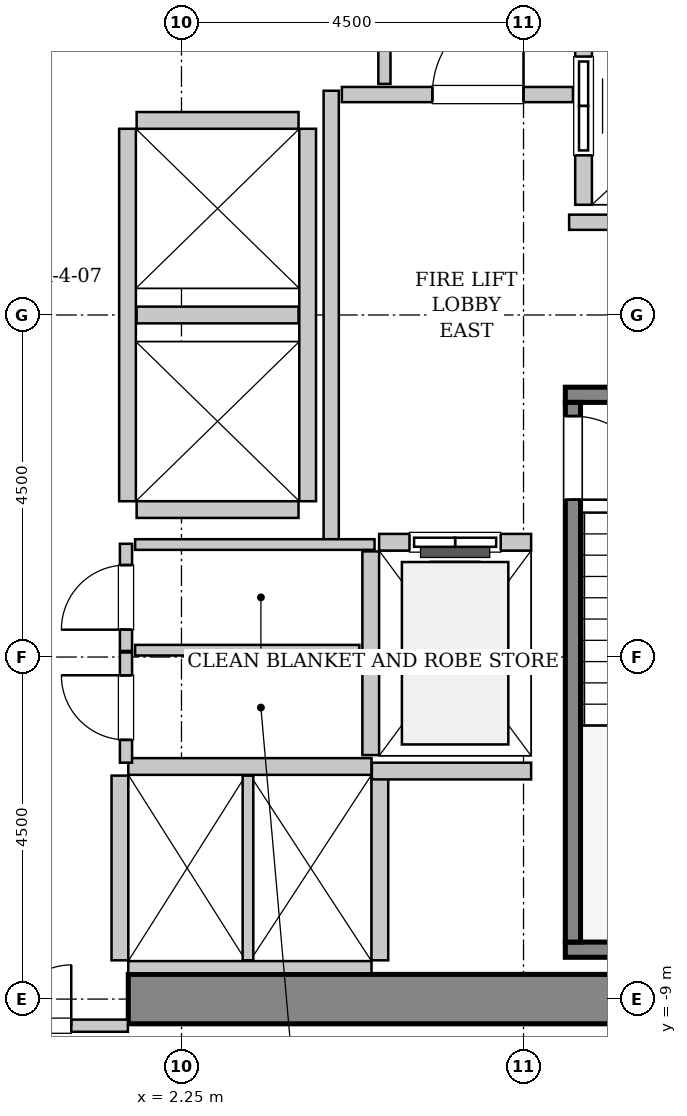
"""IFC4 building model, lengths in metres.
Left out: names, types, materials, properties, quantities, classifications, styles, units other than length and angle.
Written with IfcOpenShell. Run it as: python <this file> out.ifc"""

import sys

from ifc_helpers import new_model, si_unit, direction, frame, frame_2d, origin, place, context, subcontext, project, spatial, rectangle, extrude, source, transform, mapped, element, fill, save


model = new_model("IFC4")
c1 = context("Model", 3, precision=1e-05, world=origin(), true_north=direction((0.0, 1.0)))
c2 = subcontext(c1, "Body", "Model", "MODEL_VIEW")
j1 = project(units=[si_unit("LENGTHUNIT", "METRE"), si_unit("PLANEANGLEUNIT", "RADIAN")], contexts=[c1])
p1 = place(None, origin())
s1 = spatial("IfcSite", under=j1, at=p1, CompositionType="ELEMENT")
p2 = place(p1, origin())
s2 = spatial("IfcBuilding", under=s1, at=p2, CompositionType="ELEMENT")
p3 = place(p2, frame((0.0, 0.0, 44.4)))
s3 = spatial("IfcBuildingStorey", under=s2, at=p3, CompositionType="ELEMENT", Elevation=44.4)
m1 = source(origin(), c2, "Body", "SweptSolid", [
    extrude(rectangle(XDim=10.025, YDim=0.65, at=frame_2d((5.012, 0.0))), origin(), (0.0, 0.0, 1.0), 3.8),
])
p4 = place(p3, frame((1.55, -9.0, 0.0), z_axis=(0.0, 0.0, 1.0), x_axis=(1.0, 0.0, 0.0)))
e1 = element("IfcWall", 1, at=p4, inside=s3, PredefinedType="SHEAR", context=c2, shape_type="MappedRepresentation", body=[
    mapped(m1, transform((0.0, 0.0, 0.0), x_axis=(1.0, 0.0, 0.0), y_axis=(0.0, 1.0, 0.0), z_axis=(0.0, 0.0, 1.0), scale=1.0)),
])
m2 = source(origin(), c2, "Body", "SweptSolid", [
    extrude(rectangle(XDim=3.4, YDim=0.2, at=frame_2d((1.7, 0.0))), origin(), (0.0, 0.0, 1.0), 3.8),
])
p5 = place(p3, frame((7.3, -1.05, 0.0), z_axis=(0.0, 0.0, 1.0), x_axis=(1.0, 0.0, 0.0)))
e2 = element("IfcWall", 2, at=p5, inside=s3, PredefinedType="SOLIDWALL", context=c2, shape_type="MappedRepresentation", body=[
    mapped(m2, transform((0.0, 0.0, 0.0), x_axis=(1.0, 0.0, 0.0), y_axis=(0.0, 1.0, 0.0), z_axis=(0.0, 0.0, 1.0), scale=1.0)),
])
m3 = source(origin(), c2, "Body", "SweptSolid", [
    extrude(rectangle(XDim=3.63, YDim=0.2, at=frame_2d((1.815, 0.0))), origin(), (0.0, 0.0, 1.0), 3.8),
])
p6 = place(p3, frame((7.3, -8.35, 0.0), z_axis=(0.0, 0.0, 1.0), x_axis=(1.0, 0.0, 0.0)))
e3 = element("IfcWall", 3, at=p6, inside=s3, PredefinedType="SOLIDWALL", context=c2, shape_type="MappedRepresentation", body=[
    mapped(m3, transform((0.0, 0.0, 0.0), x_axis=(1.0, 0.0, 0.0), y_axis=(0.0, 1.0, 0.0), z_axis=(0.0, 0.0, 1.0), scale=1.0)),
])
m4 = source(origin(), c2, "Body", "SweptSolid", [
    extrude(rectangle(XDim=7.1, YDim=0.2, at=frame_2d((3.55, 0.0))), origin(), (0.0, 0.0, 1.0), 3.8),
])
p7 = place(p3, frame((7.4, -1.15, 0.0), z_axis=(0.0, 0.0, 1.0), x_axis=(0.0, -1.0, 0.0)))
e4 = element("IfcWall", 4, at=p7, inside=s3, PredefinedType="SOLIDWALL", context=c2, shape_type="MappedRepresentation", body=[
    mapped(m4, transform((0.0, 0.0, 0.0), x_axis=(1.0, 0.0, 0.0), y_axis=(0.0, 1.0, 0.0), z_axis=(0.0, 0.0, 1.0), scale=1.0)),
])
p8 = place(p7, frame((0.18, 0.0, 0.0)))
e5 = element("IfcOpeningElement", 5, at=p8, cuts=e4, PredefinedType="OPENING", context=c2, shape_type="SweptSolid", body=[
    extrude(rectangle(XDim=1.1, YDim=2.15, at=frame_2d((0.55, 1.075))), frame((0.0, 0.11, 0.0), z_axis=(0.0, -1.0, 0.0), x_axis=(1.0, 0.0, 0.0)), (0.0, 0.0, 1.0), 0.22),
])
m5 = source(origin(), c2, "Body", "SweptSolid", [
    extrude(rectangle(XDim=2.0, YDim=0.22, at=frame_2d((1.0, 0.0))), origin(), (0.0, 0.0, 1.0), 3.535),
])
p9 = place(p3, frame((6.85, -2.99, 0.0), z_axis=(0.0, 0.0, 1.0), x_axis=(-1.0, 0.0, 0.0)))
e6 = element("IfcWall", 6, at=p9, inside=s3, PredefinedType="SOLIDWALL", context=c2, shape_type="MappedRepresentation", body=[
    mapped(m5, transform((0.0, 0.0, 0.0), x_axis=(1.0, 0.0, 0.0), y_axis=(0.0, 1.0, 0.0), z_axis=(0.0, 0.0, 1.0), scale=1.0)),
])
p10 = place(p9, frame((0.4, 0.0, 0.0)))
e7 = element("IfcOpeningElement", 7, at=p10, cuts=e6, PredefinedType="OPENING", context=c2, shape_type="SweptSolid", body=[
    extrude(rectangle(XDim=1.2, YDim=2.2, at=frame_2d((0.6, 1.1))), frame((0.0, 0.12, 0.0), z_axis=(0.0, -1.0, 0.0), x_axis=(1.0, 0.0, 0.0)), (0.0, 0.0, 1.0), 0.24),
])
m6 = source(origin(), c2, "Body", "SweptSolid", [
    extrude(rectangle(XDim=2.68, YDim=0.22, at=frame_2d((1.34, 0.0))), origin(), (0.0, 0.0, 1.0), 3.535),
])
p11 = place(p3, frame((4.74, -3.11, 0.0), z_axis=(0.0, 0.0, 1.0), x_axis=(0.0, -1.0, 0.0)))
e8 = element("IfcWall", 8, at=p11, inside=s3, PredefinedType="SOLIDWALL", context=c2, shape_type="MappedRepresentation", body=[
    mapped(m6, transform((0.0, 0.0, 0.0), x_axis=(1.0, 0.0, 0.0), y_axis=(0.0, 1.0, 0.0), z_axis=(0.0, 0.0, 1.0), scale=1.0)),
])
m7 = source(origin(), c2, "Body", "SweptSolid", [
    extrude(rectangle(XDim=5.45, YDim=0.22, at=frame_2d((2.725, 0.0))), origin(), (0.0, 0.0, 1.0), 3.535),
])
p12 = place(p3, frame((7.54, 6.9, 0.0), z_axis=(0.0, 0.0, 1.0), x_axis=(0.0, -1.0, 0.0)))
e9 = element("IfcWall", 9, at=p12, inside=s3, PredefinedType="SOLIDWALL", context=c2, shape_type="MappedRepresentation", body=[
    mapped(m7, transform((0.0, 0.0, 0.0), x_axis=(1.0, 0.0, 0.0), y_axis=(0.0, 1.0, 0.0), z_axis=(0.0, 0.0, 1.0), scale=1.0)),
])
p13 = place(p12, frame((3.5, 0.0, 0.0)))
e10 = element("IfcOpeningElement", 10, at=p13, cuts=e9, PredefinedType="OPENING", context=c2, shape_type="SweptSolid", body=[
    extrude(rectangle(XDim=1.3, YDim=2.3, at=frame_2d((0.65, 1.15))), frame((0.0, 0.12, 0.0), z_axis=(0.0, -1.0, 0.0), x_axis=(1.0, 0.0, 0.0)), (0.0, 0.0, 1.0), 0.24),
])
p14 = place(p12, frame((0.65, 0.0, 0.0)))
e11 = element("IfcOpeningElement", 11, at=p14, cuts=e9, PredefinedType="OPENING", context=c2, shape_type="SweptSolid", body=[
    extrude(rectangle(XDim=1.3, YDim=2.3, at=frame_2d((0.65, 1.15))), frame((0.0, 0.12, 0.0), z_axis=(0.0, -1.0, 0.0), x_axis=(1.0, 0.0, 0.0)), (0.0, 0.0, 1.0), 0.24),
])
m8 = source(origin(), c2, "Body", "SweptSolid", [
    extrude(rectangle(XDim=3.2, YDim=0.22, at=frame_2d((1.6, 0.0))), origin(), (0.0, 0.0, 1.0), 3.535),
])
p15 = place(p3, frame((4.75, -5.94, 0.0), z_axis=(0.0, 0.0, 1.0), x_axis=(-1.0, 0.0, 0.0)))
e12 = element("IfcWall", 12, at=p15, inside=s3, PredefinedType="SOLIDWALL", context=c2, shape_type="MappedRepresentation", body=[
    mapped(m8, transform((0.0, 0.0, 0.0), x_axis=(1.0, 0.0, 0.0), y_axis=(0.0, 1.0, 0.0), z_axis=(0.0, 0.0, 1.0), scale=1.0)),
])
m9 = source(origin(), c2, "Body", "SweptSolid", [
    extrude(rectangle(XDim=3.2, YDim=0.16, at=frame_2d((1.6, 0.0))), origin(), (0.0, 0.0, 1.0), 2.425),
])
p16 = place(p3, frame((1.55, -8.58, 0.0), z_axis=(0.0, 0.0, 1.0), x_axis=(1.0, 0.0, 0.0)))
e13 = element("IfcWall", 13, at=p16, inside=s3, PredefinedType="PARTITIONING", context=c2, shape_type="MappedRepresentation", body=[
    mapped(m9, transform((0.0, 0.0, 0.0), x_axis=(1.0, 0.0, 0.0), y_axis=(0.0, 1.0, 0.0), z_axis=(0.0, 0.0, 1.0), scale=1.0)),
])
m10 = source(origin(), c2, "Body", "SweptSolid", [
    extrude(rectangle(XDim=2.43, YDim=0.22, at=frame_2d((1.215, 0.0))), origin(), (0.0, 0.0, 1.0), 3.535),
])
p17 = place(p3, frame((1.44, -6.06, 0.0), z_axis=(0.0, 0.0, 1.0), x_axis=(0.0, -1.0, 0.0)))
e14 = element("IfcWall", 14, at=p17, inside=s3, PredefinedType="SOLIDWALL", context=c2, shape_type="MappedRepresentation", body=[
    mapped(m10, transform((0.0, 0.0, 0.0), x_axis=(1.0, 0.0, 0.0), y_axis=(0.0, 1.0, 0.0), z_axis=(0.0, 0.0, 1.0), scale=1.0)),
])
m11 = source(origin(), c2, "Body", "SweptSolid", [
    extrude(rectangle(XDim=2.43, YDim=0.14, at=frame_2d((1.215, 0.0))), origin(), (0.0, 0.0, 1.0), 3.535),
])
p18 = place(p3, frame((3.125, -8.49, 0.0), z_axis=(0.0, 0.0, 1.0), x_axis=(0.0, 1.0, 0.0)))
e15 = element("IfcWall", 15, at=p18, inside=s3, PredefinedType="PARTITIONING", context=c2, shape_type="MappedRepresentation", body=[
    mapped(m11, transform((0.0, 0.0, 0.0), x_axis=(1.0, 0.0, 0.0), y_axis=(0.0, 1.0, 0.0), z_axis=(0.0, 0.0, 1.0), scale=1.0)),
])
p19 = place(p3, frame((4.86, -8.49, 0.0), z_axis=(0.0, 0.0, 1.0), x_axis=(0.0, 1.0, 0.0)))
e16 = element("IfcWall", 16, at=p19, inside=s3, PredefinedType="SOLIDWALL", context=c2, shape_type="MappedRepresentation", body=[
    mapped(m10, transform((0.0, 0.0, 0.0), x_axis=(1.0, 0.0, 0.0), y_axis=(0.0, 1.0, 0.0), z_axis=(0.0, 0.0, 1.0), scale=1.0)),
])
m12 = source(origin(), c2, "Body", "SweptSolid", [
    extrude(rectangle(XDim=4.9, YDim=0.22, at=frame_2d((2.45, 0.0))), origin(), (0.0, 0.0, 1.0), 3.535),
])
for number, where, z_axis, x_axis in (
    (17, (1.54, 2.45, 0.0), (0.0, 0.0, 1.0), (0.0, -1.0, 0.0)),
    (18, (3.91, -2.45, 0.0), (0.0, 0.0, 1.0), (0.0, 1.0, 0.0)),
):
    element("IfcWall", number, at=place(p3, frame(where, z_axis=z_axis, x_axis=x_axis)), inside=s3, PredefinedType="SOLIDWALL", context=c2, shape_type="MappedRepresentation", body=[
        mapped(m12, transform((0.0, 0.0, 0.0), x_axis=(1.0, 0.0, 0.0), y_axis=(0.0, 1.0, 0.0), z_axis=(0.0, 0.0, 1.0), scale=1.0)),
    ])
m13 = source(origin(), c2, "Body", "SweptSolid", [
    extrude(rectangle(XDim=2.13, YDim=0.22, at=frame_2d((1.065, 0.0))), origin(), (0.0, 0.0, 1.0), 3.535),
])
for number, where, z_axis, x_axis in (
    (19, (1.66, -2.56, 0.0), (0.0, 0.0, 1.0), (1.0, 0.0, 0.0)),
    (20, (1.66, 0.0, 0.0), (0.0, 0.0, 1.0), (1.0, 0.0, 0.0)),
    (21, (3.79, 2.56, 0.0), (0.0, 0.0, 1.0), (-1.0, 0.0, 0.0)),
):
    element("IfcWall", number, at=place(p3, frame(where, z_axis=z_axis, x_axis=x_axis)), inside=s3, PredefinedType="SOLIDWALL", context=c2, shape_type="MappedRepresentation", body=[
        mapped(m13, transform((0.0, 0.0, 0.0), x_axis=(1.0, 0.0, 0.0), y_axis=(0.0, 1.0, 0.0), z_axis=(0.0, 0.0, 1.0), scale=1.0)),
    ])
m14 = source(origin(), c2, "Body", "SweptSolid", [
    extrude(rectangle(XDim=2.095, YDim=0.22, at=frame_2d((1.048, 0.0))), origin(), (0.0, 0.0, 1.0), 3.535),
])
p20 = place(p3, frame((4.755, -6.0, 0.0), z_axis=(0.0, 0.0, 1.0), x_axis=(1.0, 0.0, 0.0)))
e22 = element("IfcWall", 22, at=p20, inside=s3, PredefinedType="SOLIDWALL", context=c2, shape_type="MappedRepresentation", body=[
    mapped(m14, transform((0.0, 0.0, 0.0), x_axis=(1.0, 0.0, 0.0), y_axis=(0.0, 1.0, 0.0), z_axis=(0.0, 0.0, 1.0), scale=1.0)),
])
m15 = source(origin(), c2, "Body", "SweptSolid", [
    extrude(rectangle(XDim=5.9, YDim=0.2, at=frame_2d((2.95, 0.0))), origin(), (0.0, 0.0, 1.0), 3.535),
])
p21 = place(p3, frame((4.22, -2.95, 0.0), z_axis=(0.0, 0.0, 1.0), x_axis=(0.0, 1.0, 0.0)))
e23 = element("IfcWall", 23, at=p21, inside=s3, PredefinedType="PARTITIONING", context=c2, shape_type="MappedRepresentation", body=[
    mapped(m15, transform((0.0, 0.0, 0.0), x_axis=(1.0, 0.0, 0.0), y_axis=(0.0, 1.0, 0.0), z_axis=(0.0, 0.0, 1.0), scale=1.0)),
])
m16 = source(origin(), c2, "Body", "SweptSolid", [
    extrude(rectangle(XDim=3.04, YDim=0.2, at=frame_2d((1.52, 0.0))), origin(), (0.0, 0.0, 1.0), 3.535),
])
p22 = place(p3, frame((4.36, 2.9, 0.0), z_axis=(0.0, 0.0, 1.0), x_axis=(1.0, 0.0, 0.0)))
e24 = element("IfcWall", 24, at=p22, inside=s3, PredefinedType="PARTITIONING", context=c2, shape_type="MappedRepresentation", body=[
    mapped(m16, transform((0.0, 0.0, 0.0), x_axis=(1.0, 0.0, 0.0), y_axis=(0.0, 1.0, 0.0), z_axis=(0.0, 0.0, 1.0), scale=1.0)),
])
p23 = place(p22, frame((1.19, 0.0, 0.0)))
e25 = element("IfcOpeningElement", 25, at=p23, cuts=e24, PredefinedType="OPENING", context=c2, shape_type="SweptSolid", body=[
    extrude(rectangle(XDim=1.2, YDim=2.15, at=frame_2d((0.6, 1.075))), frame((0.0, 0.11, 0.0), z_axis=(0.0, -1.0, 0.0), x_axis=(1.0, 0.0, 0.0)), (0.0, 0.0, 1.0), 0.22),
])
m17 = source(origin(), c2, "Body", "SweptSolid", [
    extrude(rectangle(XDim=4.11, YDim=0.2, at=frame_2d((2.055, 0.0))), origin(), (0.0, 0.0, 1.0), 3.535),
])
p24 = place(p3, frame((7.35, 1.22, 0.0), z_axis=(0.0, 0.0, 1.0), x_axis=(1.0, 0.0, 0.0)))
e26 = element("IfcWall", 26, at=p24, inside=s3, PredefinedType="PARTITIONING", context=c2, shape_type="MappedRepresentation", body=[
    mapped(m17, transform((0.0, 0.0, 0.0), x_axis=(1.0, 0.0, 0.0), y_axis=(0.0, 1.0, 0.0), z_axis=(0.0, 0.0, 1.0), scale=1.0)),
])
m18 = source(origin(), c2, "Body", "SweptSolid", [
    extrude(rectangle(XDim=3.09, YDim=0.16, at=frame_2d((1.545, 0.0))), origin(), (0.0, 0.0, 1.0), 2.425),
])
p25 = place(p3, frame((-1.545, -9.35, 0.0), z_axis=(0.0, 0.0, 1.0), x_axis=(1.0, 0.0, 0.0)))
e27 = element("IfcWall", 27, at=p25, inside=s3, PredefinedType="PARTITIONING", context=c2, shape_type="MappedRepresentation", body=[
    mapped(m18, transform((0.0, 0.0, 0.0), x_axis=(1.0, 0.0, 0.0), y_axis=(0.0, 1.0, 0.0), z_axis=(0.0, 0.0, 1.0), scale=1.0)),
])
p26 = place(p25, frame((0.745, 0.0, 0.0)))
e28 = element("IfcOpeningElement", 28, at=p26, cuts=e27, PredefinedType="OPENING", context=c2, shape_type="SweptSolid", body=[
    extrude(rectangle(XDim=1.6, YDim=2.3, at=frame_2d((0.8, 1.15))), frame((0.0, 0.09, 0.0), z_axis=(0.0, -1.0, 0.0), x_axis=(1.0, 0.0, 0.0)), (0.0, 0.0, 1.0), 0.18),
])
m19 = source(origin(), c2, "Body", "SweptSolid", [
    extrude(rectangle(XDim=3.015, YDim=0.16, at=frame_2d((1.507, 0.0))), origin(), (0.0, 0.0, 1.0), 3.535),
])
p27 = place(p3, frame((4.92, 3.04, 0.0), z_axis=(0.0, 0.0, 1.0), x_axis=(0.0, 1.0, 0.0)))
e29 = element("IfcWall", 29, at=p27, inside=s3, PredefinedType="PARTITIONING", context=c2, shape_type="MappedRepresentation", body=[
    mapped(m19, transform((0.0, 0.0, 0.0), x_axis=(1.0, 0.0, 0.0), y_axis=(0.0, 1.0, 0.0), z_axis=(0.0, 0.0, 1.0), scale=1.0)),
])
m20 = source(origin(), c2, "Body", "SweptSolid", [
    extrude(rectangle(XDim=1.41, YDim=0.16, at=frame_2d((0.705, 0.0))), origin(), (0.0, 0.0, 1.0), 3.535),
])
p28 = place(p3, frame((1.52, -4.42, 0.0), z_axis=(0.0, 0.0, 1.0), x_axis=(0.0, 1.0, 0.0)))
e30 = element("IfcWall", 30, at=p28, inside=s3, PredefinedType="PARTITIONING", context=c2, shape_type="MappedRepresentation", body=[
    mapped(m20, transform((0.0, 0.0, 0.0), x_axis=(1.0, 0.0, 0.0), y_axis=(0.0, 1.0, 0.0), z_axis=(0.0, 0.0, 1.0), scale=1.0)),
])
p29 = place(p28, frame((0.28, 0.0, 0.0)))
e31 = element("IfcOpeningElement", 31, at=p29, cuts=e30, PredefinedType="OPENING", context=c2, shape_type="SweptSolid", body=[
    extrude(rectangle(XDim=0.85, YDim=2.1, at=frame_2d((0.425, 1.05))), frame((0.0, 0.09, 0.0), z_axis=(0.0, -1.0, 0.0), x_axis=(1.0, 0.0, 0.0)), (0.0, 0.0, 1.0), 0.18),
])
m21 = source(origin(), c2, "Body", "SweptSolid", [
    extrude(rectangle(XDim=3.15, YDim=0.14, at=frame_2d((1.575, 0.0))), origin(), (0.0, 0.0, 1.0), 3.535),
])
p30 = place(p3, frame((1.64, -3.02, 0.0), z_axis=(0.0, 0.0, 1.0), x_axis=(1.0, 0.0, 0.0)))
e32 = element("IfcWall", 32, at=p30, inside=s3, PredefinedType="PARTITIONING", context=c2, shape_type="MappedRepresentation", body=[
    mapped(m21, transform((0.0, 0.0, 0.0), x_axis=(1.0, 0.0, 0.0), y_axis=(0.0, 1.0, 0.0), z_axis=(0.0, 0.0, 1.0), scale=1.0)),
])
m22 = source(origin(), c2, "Body", "SweptSolid", [
    extrude(rectangle(XDim=2.95, YDim=0.14, at=frame_2d((1.475, 0.0))), origin(), (0.0, 0.0, 1.0), 3.535),
])
p31 = place(p3, frame((1.64, -4.41, 0.0), z_axis=(0.0, 0.0, 1.0), x_axis=(1.0, 0.0, 0.0)))
e33 = element("IfcWall", 33, at=p31, inside=s3, PredefinedType="PARTITIONING", context=c2, shape_type="MappedRepresentation", body=[
    mapped(m22, transform((0.0, 0.0, 0.0), x_axis=(1.0, 0.0, 0.0), y_axis=(0.0, 1.0, 0.0), z_axis=(0.0, 0.0, 1.0), scale=1.0)),
])
m23 = source(origin(), c2, "Body", "SweptSolid", [
    extrude(rectangle(XDim=1.45, YDim=0.16, at=frame_2d((0.725, 0.0))), origin(), (0.0, 0.0, 1.0), 3.535),
])
p32 = place(p3, frame((1.52, -5.89, 0.0), z_axis=(0.0, 0.0, 1.0), x_axis=(0.0, 1.0, 0.0)))
e34 = element("IfcWall", 34, at=p32, inside=s3, PredefinedType="PARTITIONING", context=c2, shape_type="MappedRepresentation", body=[
    mapped(m23, transform((0.0, 0.0, 0.0), x_axis=(1.0, 0.0, 0.0), y_axis=(0.0, 1.0, 0.0), z_axis=(0.0, 0.0, 1.0), scale=1.0)),
])
p33 = place(p32, frame((0.3, 0.0, 0.0)))
e35 = element("IfcOpeningElement", 35, at=p33, cuts=e34, PredefinedType="OPENING", context=c2, shape_type="SweptSolid", body=[
    extrude(rectangle(XDim=0.85, YDim=2.1, at=frame_2d((0.425, 1.05))), frame((0.0, 0.09, 0.0), z_axis=(0.0, -1.0, 0.0), x_axis=(1.0, 0.0, 0.0)), (0.0, 0.0, 1.0), 0.18),
])
m24 = source(origin(), c2, "Body", "SweptSolid", [
    extrude(rectangle(XDim=1.1, YDim=2.15, at=frame_2d((0.55, 1.075))), frame((0.0, 0.025, 0.0), z_axis=(0.0, -1.0, 0.0), x_axis=(1.0, 0.0, 0.0)), (0.0, 0.0, 1.0), 0.05),
])
p34 = place(p8, origin())
e36 = element("IfcDoor", 36, at=p34, inside=s3, OperationType="SINGLE_SWING_RIGHT", PredefinedType="DOOR", context=c2, shape_type="MappedRepresentation", body=[
    mapped(m24, transform((0.0, 0.0, 0.0), x_axis=(1.0, 0.0, 0.0), y_axis=(0.0, 1.0, 0.0), z_axis=(0.0, 0.0, 1.0), scale=1.0)),
])
fill(e5, e36)
m25 = source(origin(), c2, "Body", "SweptSolid", [
    extrude(rectangle(XDim=1.2, YDim=2.2, at=frame_2d((0.6, 1.1))), frame((0.0, 0.025, 0.0), z_axis=(0.0, -1.0, 0.0), x_axis=(1.0, 0.0, 0.0)), (0.0, 0.0, 1.0), 0.05),
])
p35 = place(p10, origin())
e37 = element("IfcDoor", 37, at=p35, inside=s3, OperationType="SLIDING_TO_LEFT", PredefinedType="DOOR", context=c2, shape_type="MappedRepresentation", body=[
    mapped(m25, transform((0.0, 0.0, 0.0), x_axis=(1.0, 0.0, 0.0), y_axis=(0.0, 1.0, 0.0), z_axis=(0.0, 0.0, 1.0), scale=1.0)),
])
fill(e7, e37)
m26 = source(origin(), c2, "Body", "SweptSolid", [
    extrude(rectangle(XDim=1.3, YDim=2.3, at=frame_2d((0.65, 1.15))), frame((0.0, 0.025, 0.0), z_axis=(0.0, -1.0, 0.0), x_axis=(1.0, 0.0, 0.0)), (0.0, 0.0, 1.0), 0.05),
])
p36 = place(p13, origin())
e38 = element("IfcDoor", 38, at=p36, inside=s3, OperationType="SLIDING_TO_RIGHT", PredefinedType="DOOR", context=c2, shape_type="MappedRepresentation", body=[
    mapped(m26, transform((0.0, 0.0, 0.0), x_axis=(1.0, 0.0, 0.0), y_axis=(0.0, 1.0, 0.0), z_axis=(0.0, 0.0, 1.0), scale=1.0)),
])
fill(e10, e38)
m27 = source(origin(), c2, "Body", "SweptSolid", [
    extrude(rectangle(XDim=1.2, YDim=2.15, at=frame_2d((0.6, 1.075))), frame((0.0, 0.025, 0.0), z_axis=(0.0, -1.0, 0.0), x_axis=(1.0, 0.0, 0.0)), (0.0, 0.0, 1.0), 0.05),
])
p37 = place(p23, origin())
e39 = element("IfcDoor", 39, at=p37, inside=s3, OperationType="SINGLE_SWING_RIGHT", PredefinedType="DOOR", context=c2, shape_type="MappedRepresentation", body=[
    mapped(m27, transform((0.0, 0.0, 0.0), x_axis=(1.0, 0.0, 0.0), y_axis=(0.0, 1.0, 0.0), z_axis=(0.0, 0.0, 1.0), scale=1.0)),
])
fill(e25, e39)
m28 = source(origin(), c2, "Body", "SweptSolid", [
    extrude(rectangle(XDim=1.6, YDim=2.3, at=frame_2d((0.8, 1.15))), frame((0.0, 0.025, 0.0), z_axis=(0.0, -1.0, 0.0), x_axis=(1.0, 0.0, 0.0)), (0.0, 0.0, 1.0), 0.05),
])
p38 = place(p26, origin())
e40 = element("IfcDoor", 40, at=p38, inside=s3, OperationType="DOUBLE_DOOR_SINGLE_SWING", PredefinedType="DOOR", context=c2, shape_type="MappedRepresentation", body=[
    mapped(m28, transform((0.0, 0.0, 0.0), x_axis=(1.0, 0.0, 0.0), y_axis=(0.0, 1.0, 0.0), z_axis=(0.0, 0.0, 1.0), scale=1.0)),
])
fill(e28, e40)
m29 = source(origin(), c2, "Body", "SweptSolid", [
    extrude(rectangle(XDim=0.85, YDim=2.1, at=frame_2d((0.425, 1.05))), frame((0.0, 0.025, 0.0), z_axis=(0.0, -1.0, 0.0), x_axis=(1.0, 0.0, 0.0)), (0.0, 0.0, 1.0), 0.05),
])
p39 = place(p29, origin())
e41 = element("IfcDoor", 41, at=p39, inside=s3, OperationType="SINGLE_SWING_LEFT", PredefinedType="DOOR", context=c2, shape_type="MappedRepresentation", body=[
    mapped(m29, transform((0.0, 0.0, 0.0), x_axis=(1.0, 0.0, 0.0), y_axis=(0.0, 1.0, 0.0), z_axis=(0.0, 0.0, 1.0), scale=1.0)),
])
fill(e31, e41)
p40 = place(p33, origin())
e42 = element("IfcDoor", 42, at=p40, inside=s3, OperationType="SINGLE_SWING_RIGHT", PredefinedType="DOOR", context=c2, shape_type="MappedRepresentation", body=[
    mapped(m29, transform((0.0, 0.0, 0.0), x_axis=(1.0, 0.0, 0.0), y_axis=(0.0, 1.0, 0.0), z_axis=(0.0, 0.0, 1.0), scale=1.0)),
])
fill(e35, e42)
save(model, sys.argv[1])
